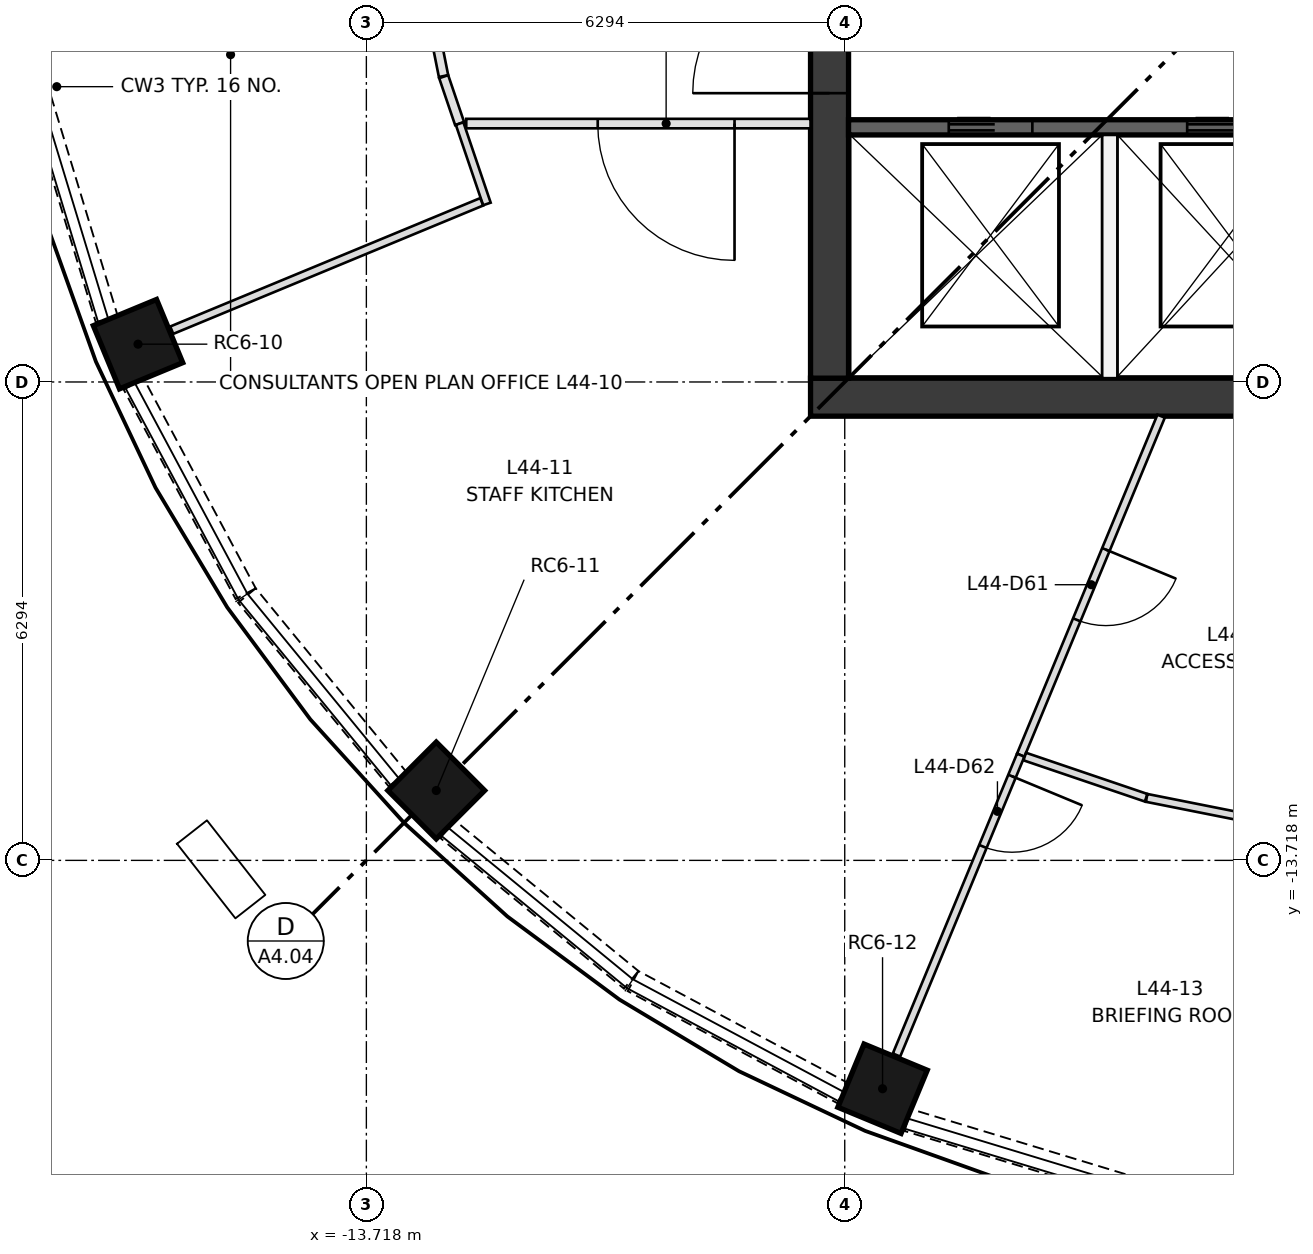
"""IFC4 building model, lengths in metres.
Left out: names, types, materials, properties, quantities, classifications, styles, units other than length and angle.
Written with IfcOpenShell. Run it as: python <this file> out.ifc"""

import sys

from ifc_helpers import new_model, si_unit, direction, frame, frame_2d, origin, origin_2d, place, context, subcontext, project, spatial, rectangle, extrude, element, fill, save


model = new_model("IFC4")
c1 = context("Model", 3, precision=1e-05, world=origin(), true_north=direction((0.0, 1.0)))
c2 = subcontext(c1, "Body", "Model", "MODEL_VIEW")
j1 = project(units=[si_unit("LENGTHUNIT", "METRE"), si_unit("PLANEANGLEUNIT", "RADIAN")], contexts=[c1])
p1 = place(None, origin())
s1 = spatial("IfcSite", under=j1, at=p1, CompositionType="ELEMENT")
p2 = place(p1, origin())
s2 = spatial("IfcBuilding", under=s1, at=p2, CompositionType="ELEMENT")
p3 = place(p2, frame((0.0, 0.0, 167.55)))
s3 = spatial("IfcBuildingStorey", under=s2, at=p3, CompositionType="ELEMENT", Elevation=167.55)
for number, where, z_axis, x_axis in (
    (1, (-16.722, -6.927, 0.0), (0.0, 0.0, 1.0), (-0.924, -0.383, 0.0)),
    (2, (-12.799, -12.799, 0.0), (0.0, 0.0, 1.0), (-0.707, -0.707, 0.0)),
    (3, (-6.927, -16.722, 0.0), (0.0, 0.0, 1.0), (-0.383, -0.924, 0.0)),
):
    element("IfcColumn", number, at=place(p3, frame(where, z_axis=z_axis, x_axis=x_axis)), inside=s3, PredefinedType="COLUMN", context=c2, shape_type="SweptSolid", body=[
        extrude(rectangle(XDim=0.9, YDim=0.9, at=origin_2d()), origin(), (0.0, 0.0, 1.0), 3.35),
    ])
p4 = place(p3, frame((-7.874, -7.624, 0.0), z_axis=(0.0, 0.0, 1.0), x_axis=(1.0, 0.0, 0.0)))
e4 = element("IfcWall", 4, at=p4, inside=s3, PredefinedType="SHEAR", context=c2, shape_type="SweptSolid", body=[
    extrude(rectangle(XDim=15.748, YDim=0.5, at=frame_2d((7.874, 0.0))), origin(), (0.0, 0.0, 1.0), 3.35),
])
p5 = place(p3, frame((-7.624, -7.374, 0.0), z_axis=(0.0, 0.0, 1.0), x_axis=(0.0, 1.0, 0.0)))
e5 = element("IfcWall", 5, at=p5, inside=s3, PredefinedType="SHEAR", context=c2, shape_type="SweptSolid", body=[
    extrude(rectangle(XDim=14.748, YDim=0.5, at=frame_2d((7.374, 0.0))), origin(), (0.0, 0.0, 1.0), 3.35),
])
p6 = place(p5, frame((6.874, 0.0, 0.0)))
e6 = element("IfcOpeningElement", 6, at=p6, cuts=e5, PredefinedType="OPENING", context=c2, shape_type="SweptSolid", body=[
    extrude(rectangle(XDim=1.0, YDim=2.1, at=frame_2d((0.5, 1.05))), frame((0.0, 0.26, 0.0), z_axis=(0.0, -1.0, 0.0), x_axis=(1.0, 0.0, 0.0)), (0.0, 0.0, 1.0), 0.52),
])
p7 = place(p5, frame((3.75, 0.0, 0.0)))
e7 = element("IfcOpeningElement", 7, at=p7, cuts=e5, PredefinedType="OPENING", context=c2, shape_type="SweptSolid", body=[
    extrude(rectangle(XDim=1.8, YDim=2.1, at=frame_2d((0.9, 1.05))), frame((0.0, 0.26, 0.0), z_axis=(0.0, -1.0, 0.0), x_axis=(1.0, 0.0, 0.0)), (0.0, 0.0, 1.0), 0.52),
])
p8 = place(p5, frame((9.198, 0.0, 0.0)))
e8 = element("IfcOpeningElement", 8, at=p8, cuts=e5, PredefinedType="OPENING", context=c2, shape_type="SweptSolid", body=[
    extrude(rectangle(XDim=1.8, YDim=2.1, at=frame_2d((0.9, 1.05))), frame((0.0, 0.26, 0.0), z_axis=(0.0, -1.0, 0.0), x_axis=(1.0, 0.0, 0.0)), (0.0, 0.0, 1.0), 0.52),
])
p9 = place(p3, frame((-7.374, -4.074, 0.0), z_axis=(0.0, 0.0, 1.0), x_axis=(1.0, 0.0, 0.0)))
e9 = element("IfcWall", 9, at=p9, inside=s3, PredefinedType="SHEAR", context=c2, shape_type="SweptSolid", body=[
    extrude(rectangle(XDim=14.748, YDim=0.2, at=frame_2d((7.374, 0.0))), origin(), (0.0, 0.0, 1.0), 3.0),
])
p10 = place(p9, frame((1.319, 0.0, 0.0)))
e10 = element("IfcOpeningElement", 10, at=p10, cuts=e9, PredefinedType="OPENING", context=c2, shape_type="SweptSolid", body=[
    extrude(rectangle(XDim=1.1, YDim=2.1, at=frame_2d((0.55, 1.05))), frame((0.0, 0.11, 0.0), z_axis=(0.0, -1.0, 0.0), x_axis=(1.0, 0.0, 0.0)), (0.0, 0.0, 1.0), 0.22),
])
p11 = place(p9, frame((4.456, 0.0, 0.0)))
e11 = element("IfcOpeningElement", 11, at=p11, cuts=e9, PredefinedType="OPENING", context=c2, shape_type="SweptSolid", body=[
    extrude(rectangle(XDim=1.1, YDim=2.1, at=frame_2d((0.55, 1.05))), frame((0.0, 0.11, 0.0), z_axis=(0.0, -1.0, 0.0), x_axis=(1.0, 0.0, 0.0)), (0.0, 0.0, 1.0), 0.22),
])
p12 = place(p9, frame((7.551, 0.0, 0.0)))
e12 = element("IfcOpeningElement", 12, at=p12, cuts=e9, PredefinedType="OPENING", context=c2, shape_type="SweptSolid", body=[
    extrude(rectangle(XDim=1.0, YDim=2.1, at=frame_2d((0.5, 1.05))), frame((0.0, 0.11, 0.0), z_axis=(0.0, -1.0, 0.0), x_axis=(1.0, 0.0, 0.0)), (0.0, 0.0, 1.0), 0.22),
])
p13 = place(p9, frame((9.914, 0.0, 0.0)))
e13 = element("IfcOpeningElement", 13, at=p13, cuts=e9, PredefinedType="OPENING", context=c2, shape_type="SweptSolid", body=[
    extrude(rectangle(XDim=1.0, YDim=2.1, at=frame_2d((0.5, 1.05))), frame((0.0, 0.11, 0.0), z_axis=(0.0, -1.0, 0.0), x_axis=(1.0, 0.0, 0.0)), (0.0, 0.0, 1.0), 0.22),
])
p14 = place(p9, frame((11.688, 0.0, 0.0)))
e14 = element("IfcOpeningElement", 14, at=p14, cuts=e9, PredefinedType="OPENING", context=c2, shape_type="SweptSolid", body=[
    extrude(rectangle(XDim=1.0, YDim=2.1, at=frame_2d((0.5, 1.05))), frame((0.0, 0.11, 0.0), z_axis=(0.0, -1.0, 0.0), x_axis=(1.0, 0.0, 0.0)), (0.0, 0.0, 1.0), 0.22),
])
p15 = place(p9, frame((13.461, 0.0, 0.0)))
e15 = element("IfcOpeningElement", 15, at=p15, cuts=e9, PredefinedType="OPENING", context=c2, shape_type="SweptSolid", body=[
    extrude(rectangle(XDim=1.0, YDim=2.1, at=frame_2d((0.5, 1.05))), frame((0.0, 0.11, 0.0), z_axis=(0.0, -1.0, 0.0), x_axis=(1.0, 0.0, 0.0)), (0.0, 0.0, 1.0), 0.22),
])
p16 = place(p3, frame((-3.937, -7.374, 0.0), z_axis=(0.0, 0.0, 1.0), x_axis=(0.0, 1.0, 0.0)))
e16 = element("IfcWall", 16, at=p16, inside=s3, PredefinedType="PARTITIONING", context=c2, shape_type="SweptSolid", body=[
    extrude(rectangle(XDim=3.2, YDim=0.2, at=frame_2d((1.6, 0.0))), origin(), (0.0, 0.0, 1.0), 3.0),
])
p17 = place(p3, frame((-18.042, -3.604, 0.0), z_axis=(0.0, 0.0, 1.0), x_axis=(0.290083245834, -0.957001416136, 0.0)))
e17 = element("IfcWall", 17, at=p17, inside=s3, PredefinedType="SOLIDWALL", context=c2, shape_type="SweptSolid", body=[
    extrude(rectangle(XDim=3.127, YDim=0.3, at=frame_2d((1.563, 0.0))), origin(), (0.0, 0.0, 1.0), 0.9),
])
p18 = place(p3, frame((-16.779, -7.452, 0.0), z_axis=(0.0, 0.0, 1.0), x_axis=(0.47120441036, -0.882024038027, 0.0)))
e18 = element("IfcWall", 18, at=p18, inside=s3, PredefinedType="SOLIDWALL", context=c2, shape_type="SweptSolid", body=[
    extrude(rectangle(XDim=3.125, YDim=0.3, at=frame_2d((1.562, 0.0))), origin(), (0.0, 0.0, 1.0), 0.9),
])
for number, where, z_axis, x_axis in (
    (19, (-15.29, -10.234, 0.0), (0.0, 0.0, 1.0), (0.634, -0.773, 0.0)),
    (20, (-12.651, -13.306, 0.0), (0.0, 0.0, 1.0), (0.773, -0.634, 0.0)),
):
    element("IfcWall", number, at=place(p3, frame(where, z_axis=z_axis, x_axis=x_axis)), inside=s3, PredefinedType="SOLIDWALL", context=c2, shape_type="SweptSolid", body=[
        extrude(rectangle(XDim=3.127, YDim=0.3, at=frame_2d((1.563, 0.0))), origin(), (0.0, 0.0, 1.0), 0.9),
    ])
p19 = place(p3, frame((-10.209, -15.306, 0.0), z_axis=(0.0, 0.0, 1.0), x_axis=(0.882024038027, -0.47120441036, 0.0)))
e21 = element("IfcWall", 21, at=p19, inside=s3, PredefinedType="SOLIDWALL", context=c2, shape_type="SweptSolid", body=[
    extrude(rectangle(XDim=3.125, YDim=0.3, at=frame_2d((1.562, 0.0))), origin(), (0.0, 0.0, 1.0), 0.9),
])
p20 = place(p3, frame((-6.596, -17.135, 0.0), z_axis=(0.0, 0.0, 1.0), x_axis=(0.957001416136, -0.290083245834, 0.0)))
e22 = element("IfcWall", 22, at=p20, inside=s3, PredefinedType="SOLIDWALL", context=c2, shape_type="SweptSolid", body=[
    extrude(rectangle(XDim=3.127, YDim=0.3, at=frame_2d((1.563, 0.0))), origin(), (0.0, 0.0, 1.0), 0.9),
])
p21 = place(p3, frame((-12.703, -3.399, 0.0), z_axis=(0.0, 0.0, 1.0), x_axis=(-0.195101249107, 0.980783106806, 0.0)))
e23 = element("IfcWall", 23, at=p21, inside=s3, PredefinedType="PARTITIONING", context=c2, shape_type="SweptSolid", body=[
    extrude(rectangle(XDim=1.712, YDim=0.125, at=frame_2d((0.856, 0.0))), origin(), (0.0, 0.0, 1.0), 3.0),
])
p22 = place(p21, frame((0.4, 0.0, 0.0)))
e24 = element("IfcOpeningElement", 24, at=p22, cuts=e23, PredefinedType="OPENING", context=c2, shape_type="SweptSolid", body=[
    extrude(rectangle(XDim=1.0, YDim=2.1, at=frame_2d((0.5, 1.05))), frame((0.0, 0.073, 0.0), z_axis=(0.0, -1.0, 0.0), x_axis=(1.0, 0.0, 0.0)), (0.0, 0.0, 1.0), 0.145),
])
p23 = place(p3, frame((-12.491, -4.024, 0.0), z_axis=(0.0, 0.0, 1.0), x_axis=(-0.321506357846, 0.946907419902, 0.0)))
e25 = element("IfcWall", 25, at=p23, inside=s3, PredefinedType="PARTITIONING", context=c2, shape_type="SweptSolid", body=[
    extrude(rectangle(XDim=0.652, YDim=0.125, at=frame_2d((0.326, 0.0))), origin(), (0.0, 0.0, 1.0), 3.0),
])
p24 = place(p3, frame((-7.874, -4.024, 0.0), z_axis=(0.0, 0.0, 1.0), x_axis=(-1.0, 0.0, 0.0)))
e26 = element("IfcWall", 26, at=p24, inside=s3, PredefinedType="PARTITIONING", context=c2, shape_type="SweptSolid", body=[
    extrude(rectangle(XDim=4.53, YDim=0.125, at=frame_2d((2.265, 0.0))), origin(), (0.0, 0.0, 1.0), 3.0),
])
p25 = place(p24, frame((1.0, 0.0, 0.0)))
e27 = element("IfcOpeningElement", 27, at=p25, cuts=e26, PredefinedType="OPENING", context=c2, shape_type="SweptSolid", body=[
    extrude(rectangle(XDim=1.8, YDim=2.1, at=frame_2d((0.9, 1.05))), frame((0.0, 0.073, 0.0), z_axis=(0.0, -1.0, 0.0), x_axis=(1.0, 0.0, 0.0)), (0.0, 0.0, 1.0), 0.145),
])
p26 = place(p3, frame((-12.491, -4.024, 0.0), z_axis=(0.0, 0.0, 1.0), x_axis=(0.321534356008, -0.946897913139, 0.0)))
e28 = element("IfcWall", 28, at=p26, inside=s3, PredefinedType="PARTITIONING", context=c2, shape_type="SweptSolid", body=[
    extrude(rectangle(XDim=1.117, YDim=0.105, at=frame_2d((0.559, 0.0))), origin(), (0.0, 0.0, 1.0), 3.0),
])
p27 = place(p3, frame((-12.201, -5.054, 0.0), z_axis=(0.0, 0.0, 1.0), x_axis=(-0.923879989031, -0.382682330227, 0.0)))
e29 = element("IfcWall", 29, at=p27, inside=s3, PredefinedType="PARTITIONING", context=c2, shape_type="SweptSolid", body=[
    extrude(rectangle(XDim=4.414, YDim=0.105, at=frame_2d((2.207, 0.0))), origin(), (0.0, 0.0, 1.0), 3.0),
])
p28 = place(p3, frame((-3.261, -7.874, 0.0), z_axis=(0.0, 0.0, 1.0), x_axis=(-0.382707643949, -0.923869503373, 0.0)))
e30 = element("IfcWall", 30, at=p28, inside=s3, PredefinedType="PARTITIONING", context=c2, shape_type="SweptSolid", body=[
    extrude(rectangle(XDim=4.827, YDim=0.105, at=frame_2d((2.414, 0.0))), origin(), (0.0, 0.0, 1.0), 3.0),
])
p29 = place(p28, frame((1.9, 0.0, 0.0)))
e31 = element("IfcOpeningElement", 31, at=p29, cuts=e30, PredefinedType="OPENING", context=c2, shape_type="SweptSolid", body=[
    extrude(rectangle(XDim=1.0, YDim=2.1, at=frame_2d((0.5, 1.05))), frame((0.0, 0.062, 0.0), z_axis=(0.0, -1.0, 0.0), x_axis=(1.0, 0.0, 0.0)), (0.0, 0.0, 1.0), 0.125),
])
p30 = place(p3, frame((-5.109, -12.334, 0.0), z_axis=(0.0, 0.0, 1.0), x_axis=(-0.382669916503, -0.923885130849, 0.0)))
e32 = element("IfcWall", 32, at=p30, inside=s3, PredefinedType="PARTITIONING", context=c2, shape_type="SweptSolid", body=[
    extrude(rectangle(XDim=4.27, YDim=0.105, at=frame_2d((2.135, 0.0))), origin(), (0.0, 0.0, 1.0), 3.0),
])
p31 = place(p30, frame((0.3, 0.0, 0.0)))
e33 = element("IfcOpeningElement", 33, at=p31, cuts=e32, PredefinedType="OPENING", context=c2, shape_type="SweptSolid", body=[
    extrude(rectangle(XDim=1.0, YDim=2.1, at=frame_2d((0.5, 1.05))), frame((0.0, 0.062, 0.0), z_axis=(0.0, -1.0, 0.0), x_axis=(1.0, 0.0, 0.0)), (0.0, 0.0, 1.0), 0.125),
])
p32 = place(p3, frame((-3.458, -12.894, 0.0), z_axis=(0.0, 0.0, 1.0), x_axis=(-0.946917341597, 0.321477134773, 0.0)))
e34 = element("IfcWall", 34, at=p32, inside=s3, PredefinedType="PARTITIONING", context=c2, shape_type="SweptSolid", body=[
    extrude(rectangle(XDim=1.687, YDim=0.105, at=frame_2d((0.843, 0.0))), origin(), (0.0, 0.0, 1.0), 3.0),
])
p33 = place(p3, frame((-1.746, -13.235, 0.0), z_axis=(0.0, 0.0, 1.0), x_axis=(-0.980785270285, 0.195090372882, 0.0)))
e35 = element("IfcWall", 35, at=p33, inside=s3, PredefinedType="PARTITIONING", context=c2, shape_type="SweptSolid", body=[
    extrude(rectangle(XDim=1.74, YDim=0.105, at=frame_2d((0.87, 0.0))), origin(), (0.0, 0.0, 1.0), 3.0),
])
p34 = place(p10, origin())
e36 = element("IfcDoor", 36, at=p34, inside=s3, OperationType="DOUBLE_DOOR_SLIDING", PredefinedType="DOOR", context=c2, shape_type="SweptSolid", body=[
    extrude(rectangle(XDim=1.1, YDim=2.1, at=frame_2d((0.55, 1.05))), frame((0.0, 0.025, 0.0), z_axis=(0.0, -1.0, 0.0), x_axis=(1.0, 0.0, 0.0)), (0.0, 0.0, 1.0), 0.05),
])
fill(e10, e36)
p35 = place(p11, origin())
e37 = element("IfcDoor", 37, at=p35, inside=s3, OperationType="DOUBLE_DOOR_SLIDING", PredefinedType="DOOR", context=c2, shape_type="SweptSolid", body=[
    extrude(rectangle(XDim=1.1, YDim=2.1, at=frame_2d((0.55, 1.05))), frame((0.0, 0.025, 0.0), z_axis=(0.0, -1.0, 0.0), x_axis=(1.0, 0.0, 0.0)), (0.0, 0.0, 1.0), 0.05),
])
fill(e11, e37)
p36 = place(p7, origin())
e38 = element("IfcDoor", 38, at=p36, inside=s3, OperationType="DOUBLE_DOOR_SINGLE_SWING", PredefinedType="DOOR", context=c2, shape_type="SweptSolid", body=[
    extrude(rectangle(XDim=1.8, YDim=2.1, at=frame_2d((0.9, 1.05))), frame((0.0, 0.025, 0.0), z_axis=(0.0, -1.0, 0.0), x_axis=(1.0, 0.0, 0.0)), (0.0, 0.0, 1.0), 0.05),
])
fill(e7, e38)
p37 = place(p25, origin())
e39 = element("IfcDoor", 39, at=p37, inside=s3, OperationType="DOUBLE_DOOR_SINGLE_SWING", PredefinedType="DOOR", context=c2, shape_type="SweptSolid", body=[
    extrude(rectangle(XDim=1.8, YDim=2.1, at=frame_2d((0.9, 1.05))), frame((0.0, 0.025, 0.0), z_axis=(0.0, -1.0, 0.0), x_axis=(1.0, 0.0, 0.0)), (0.0, 0.0, 1.0), 0.05),
])
fill(e27, e39)
p38 = place(p29, origin())
e40 = element("IfcDoor", 40, at=p38, inside=s3, OperationType="SINGLE_SWING_LEFT", PredefinedType="DOOR", context=c2, shape_type="SweptSolid", body=[
    extrude(rectangle(XDim=1.0, YDim=2.1, at=frame_2d((0.5, 1.05))), frame((0.0, 0.025, 0.0), z_axis=(0.0, -1.0, 0.0), x_axis=(1.0, 0.0, 0.0)), (0.0, 0.0, 1.0), 0.05),
])
fill(e31, e40)
p39 = place(p31, origin())
e41 = element("IfcDoor", 41, at=p39, inside=s3, OperationType="SINGLE_SWING_LEFT", PredefinedType="DOOR", context=c2, shape_type="SweptSolid", body=[
    extrude(rectangle(XDim=1.0, YDim=2.1, at=frame_2d((0.5, 1.05))), frame((0.0, 0.025, 0.0), z_axis=(0.0, -1.0, 0.0), x_axis=(1.0, 0.0, 0.0)), (0.0, 0.0, 1.0), 0.05),
])
fill(e33, e41)
save(model, sys.argv[1])
